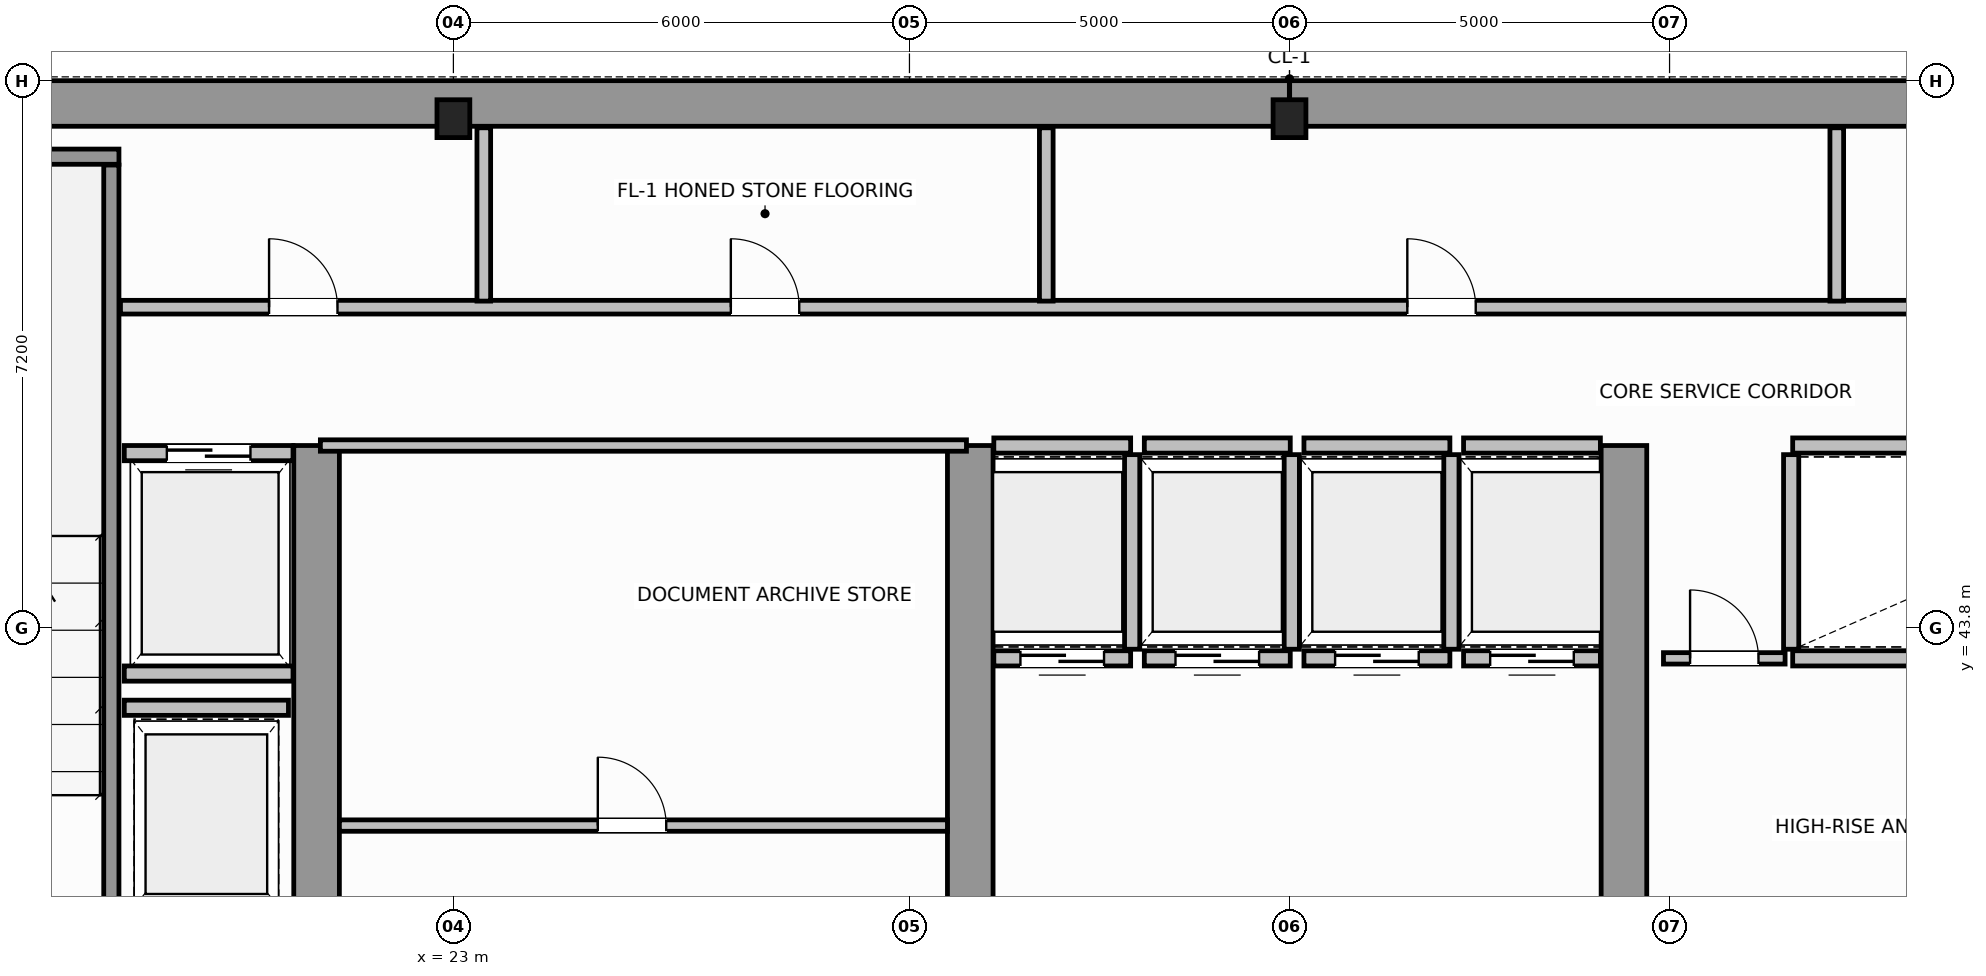
"""IFC4 building model, lengths in metres.
Left out: names, types, materials, properties, quantities, classifications, styles, units other than length and angle.
Written with IfcOpenShell. Run it as: python <this file> out.ifc"""

import sys

from ifc_helpers import new_model, si_unit, direction, frame, frame_2d, origin, origin_2d, place, context, subcontext, project, spatial, rectangle, i_section, extrude, source, transform, mapped, element, fill, save


model = new_model("IFC4")
c1 = context("Model", 3, precision=1e-05, world=origin(), true_north=direction((0.0, 1.0)))
c2 = subcontext(c1, "Body", "Model", "MODEL_VIEW")
j1 = project(units=[si_unit("LENGTHUNIT", "METRE"), si_unit("PLANEANGLEUNIT", "RADIAN")], contexts=[c1])
p1 = place(None, origin())
s1 = spatial("IfcSite", under=j1, at=p1, CompositionType="ELEMENT")
p2 = place(p1, origin())
s2 = spatial("IfcBuilding", under=s1, at=p2, CompositionType="ELEMENT")
p3 = place(p2, frame((0.0, 0.0, 191.8)))
s3 = spatial("IfcBuildingStorey", under=s2, at=p3, CompositionType="ELEMENT", Elevation=191.8)
m1 = source(origin(), c2, "Body", "SweptSolid", [
    extrude(i_section(OverallWidth=0.432, OverallDepth=0.498, WebThickness=0.055, FlangeThickness=0.068, FilletRadius=0.015, at=origin_2d()), origin(), (0.0, 0.0, 1.0), 3.8),
])
for number, where, z_axis, x_axis in (
    (1, (23.0, 50.5, 0.0), (0.0, 0.0, 1.0), (1.0, 0.0, 0.0)),
    (2, (34.0, 50.5, 0.0), (0.0, 0.0, 1.0), (1.0, 0.0, 0.0)),
):
    element("IfcColumn", number, at=place(p3, frame(where, z_axis=z_axis, x_axis=x_axis)), inside=s3, PredefinedType="COLUMN", context=c2, shape_type="MappedRepresentation", body=[
        mapped(m1, transform((0.0, 0.0, 0.0), scale=1.0)),
    ])
for number, where, z_axis, x_axis in (
    (3, (14.304, 50.7, 0.0), (0.0, 0.0, 1.0), (1.0, 0.0, 0.0)),
    (4, (34.002, 50.7, 0.0), (0.0, 0.0, 1.0), (1.0, 0.0, 0.0)),
):
    element("IfcWall", number, at=place(p3, frame(where, z_axis=z_axis, x_axis=x_axis)), inside=s3, PredefinedType="SHEAR", context=c2, shape_type="SweptSolid", body=[
        extrude(rectangle(XDim=19.694, YDim=0.6, at=frame_2d((9.847, 0.0))), origin(), (0.0, 0.0, 1.0), 3.8),
    ])
for number, where, z_axis, x_axis in (
    (5, (21.2, 36.82, 0.0), (0.0, 0.0, 1.0), (0.0, 1.0, 0.0)),
    (6, (29.8, 36.82, 0.0), (0.0, 0.0, 1.0), (0.0, 1.0, 0.0)),
    (7, (38.4, 36.82, 0.0), (0.0, 0.0, 1.0), (0.0, 1.0, 0.0)),
):
    element("IfcWall", number, at=place(p3, frame(where, z_axis=z_axis, x_axis=x_axis)), inside=s3, PredefinedType="SHEAR", context=c2, shape_type="SweptSolid", body=[
        extrude(rectangle(XDim=9.38, YDim=0.6, at=frame_2d((4.69, 0.0))), origin(), (0.0, 0.0, 1.0), 3.8),
    ])
p4 = place(p3, frame((14.3, 50.0, 0.0), z_axis=(0.0, 0.0, 1.0), x_axis=(1.0, 0.0, 0.0)))
e8 = element("IfcWall", 8, at=p4, inside=s3, PredefinedType="SOLIDWALL", context=c2, shape_type="SweptSolid", body=[
    extrude(rectangle(XDim=4.3, YDim=0.2, at=frame_2d((2.15, 0.0))), origin(), (0.0, 0.0, 1.0), 3.8),
])
p5 = place(p3, frame((18.5, 39.96, 0.0), z_axis=(0.0, 0.0, 1.0), x_axis=(0.0, 1.0, 0.0)))
e9 = element("IfcWall", 9, at=p5, inside=s3, PredefinedType="SOLIDWALL", context=c2, shape_type="SweptSolid", body=[
    extrude(rectangle(XDim=9.93, YDim=0.2, at=frame_2d((4.965, 0.0))), origin(), (0.0, 0.0, 1.0), 3.8),
])
p6 = place(p3, frame((30.11, 43.4, 0.0), z_axis=(0.0, 0.0, 1.0), x_axis=(1.0, 0.0, 0.0)))
e10 = element("IfcWall", 10, at=p6, inside=s3, PredefinedType="SOLIDWALL", context=c2, shape_type="SweptSolid", body=[
    extrude(rectangle(XDim=1.8, YDim=0.2, at=frame_2d((0.9, 0.0))), origin(), (0.0, 0.0, 1.0), 3.58),
])
p7 = place(p6, frame((0.35, 0.0, 0.0)))
e11 = element("IfcOpeningElement", 11, at=p7, cuts=e10, PredefinedType="OPENING", context=c2, shape_type="SweptSolid", body=[
    extrude(rectangle(XDim=1.1, YDim=2.15, at=frame_2d((0.55, 1.075))), frame((0.0, 0.11, 0.0), z_axis=(0.0, -1.0, 0.0), x_axis=(1.0, 0.0, 0.0)), (0.0, 0.0, 1.0), 0.22),
])
p8 = place(p3, frame((30.11, 46.2, 0.0), z_axis=(0.0, 0.0, 1.0), x_axis=(1.0, 0.0, 0.0)))
e12 = element("IfcWall", 12, at=p8, inside=s3, PredefinedType="SOLIDWALL", context=c2, shape_type="SweptSolid", body=[
    extrude(rectangle(XDim=1.8, YDim=0.2, at=frame_2d((0.9, 0.0))), origin(), (0.0, 0.0, 1.0), 3.58),
])
p9 = place(p3, frame((31.93, 43.52, 0.0), z_axis=(0.0, 0.0, 1.0), x_axis=(0.0, 1.0, 0.0)))
e13 = element("IfcWall", 13, at=p9, inside=s3, PredefinedType="SOLIDWALL", context=c2, shape_type="SweptSolid", body=[
    extrude(rectangle(XDim=2.56, YDim=0.2, at=frame_2d((1.28, 0.0))), origin(), (0.0, 0.0, 1.0), 3.58),
])
p10 = place(p3, frame((32.09, 43.4, 0.0), z_axis=(0.0, 0.0, 1.0), x_axis=(1.0, 0.0, 0.0)))
e14 = element("IfcWall", 14, at=p10, inside=s3, PredefinedType="SOLIDWALL", context=c2, shape_type="SweptSolid", body=[
    extrude(rectangle(XDim=1.92, YDim=0.2, at=frame_2d((0.96, 0.0))), origin(), (0.0, 0.0, 1.0), 3.58),
])
p11 = place(p10, frame((0.41, 0.0, 0.0)))
e15 = element("IfcOpeningElement", 15, at=p11, cuts=e14, PredefinedType="OPENING", context=c2, shape_type="SweptSolid", body=[
    extrude(rectangle(XDim=1.1, YDim=2.15, at=frame_2d((0.55, 1.075))), frame((0.0, 0.11, 0.0), z_axis=(0.0, -1.0, 0.0), x_axis=(1.0, 0.0, 0.0)), (0.0, 0.0, 1.0), 0.22),
])
p12 = place(p3, frame((32.09, 46.2, 0.0), z_axis=(0.0, 0.0, 1.0), x_axis=(1.0, 0.0, 0.0)))
e16 = element("IfcWall", 16, at=p12, inside=s3, PredefinedType="SOLIDWALL", context=c2, shape_type="SweptSolid", body=[
    extrude(rectangle(XDim=1.92, YDim=0.2, at=frame_2d((0.96, 0.0))), origin(), (0.0, 0.0, 1.0), 3.58),
])
p13 = place(p3, frame((34.03, 43.52, 0.0), z_axis=(0.0, 0.0, 1.0), x_axis=(0.0, 1.0, 0.0)))
e17 = element("IfcWall", 17, at=p13, inside=s3, PredefinedType="SOLIDWALL", context=c2, shape_type="SweptSolid", body=[
    extrude(rectangle(XDim=2.56, YDim=0.2, at=frame_2d((1.28, 0.0))), origin(), (0.0, 0.0, 1.0), 3.58),
])
p14 = place(p3, frame((34.19, 43.4, 0.0), z_axis=(0.0, 0.0, 1.0), x_axis=(1.0, 0.0, 0.0)))
e18 = element("IfcWall", 18, at=p14, inside=s3, PredefinedType="SOLIDWALL", context=c2, shape_type="SweptSolid", body=[
    extrude(rectangle(XDim=1.92, YDim=0.2, at=frame_2d((0.96, 0.0))), origin(), (0.0, 0.0, 1.0), 3.58),
])
p15 = place(p14, frame((0.41, 0.0, 0.0)))
e19 = element("IfcOpeningElement", 19, at=p15, cuts=e18, PredefinedType="OPENING", context=c2, shape_type="SweptSolid", body=[
    extrude(rectangle(XDim=1.1, YDim=2.15, at=frame_2d((0.55, 1.075))), frame((0.0, 0.11, 0.0), z_axis=(0.0, -1.0, 0.0), x_axis=(1.0, 0.0, 0.0)), (0.0, 0.0, 1.0), 0.22),
])
p16 = place(p3, frame((34.19, 46.2, 0.0), z_axis=(0.0, 0.0, 1.0), x_axis=(1.0, 0.0, 0.0)))
e20 = element("IfcWall", 20, at=p16, inside=s3, PredefinedType="SOLIDWALL", context=c2, shape_type="SweptSolid", body=[
    extrude(rectangle(XDim=1.92, YDim=0.2, at=frame_2d((0.96, 0.0))), origin(), (0.0, 0.0, 1.0), 3.58),
])
p17 = place(p3, frame((36.13, 43.52, 0.0), z_axis=(0.0, 0.0, 1.0), x_axis=(0.0, 1.0, 0.0)))
e21 = element("IfcWall", 21, at=p17, inside=s3, PredefinedType="SOLIDWALL", context=c2, shape_type="SweptSolid", body=[
    extrude(rectangle(XDim=2.56, YDim=0.2, at=frame_2d((1.28, 0.0))), origin(), (0.0, 0.0, 1.0), 3.58),
])
p18 = place(p3, frame((36.29, 43.4, 0.0), z_axis=(0.0, 0.0, 1.0), x_axis=(1.0, 0.0, 0.0)))
e22 = element("IfcWall", 22, at=p18, inside=s3, PredefinedType="SOLIDWALL", context=c2, shape_type="SweptSolid", body=[
    extrude(rectangle(XDim=1.8, YDim=0.2, at=frame_2d((0.9, 0.0))), origin(), (0.0, 0.0, 1.0), 3.58),
])
p19 = place(p18, frame((0.35, 0.0, 0.0)))
e23 = element("IfcOpeningElement", 23, at=p19, cuts=e22, PredefinedType="OPENING", context=c2, shape_type="SweptSolid", body=[
    extrude(rectangle(XDim=1.1, YDim=2.15, at=frame_2d((0.55, 1.075))), frame((0.0, 0.11, 0.0), z_axis=(0.0, -1.0, 0.0), x_axis=(1.0, 0.0, 0.0)), (0.0, 0.0, 1.0), 0.22),
])
p20 = place(p3, frame((36.29, 46.2, 0.0), z_axis=(0.0, 0.0, 1.0), x_axis=(1.0, 0.0, 0.0)))
e24 = element("IfcWall", 24, at=p20, inside=s3, PredefinedType="SOLIDWALL", context=c2, shape_type="SweptSolid", body=[
    extrude(rectangle(XDim=1.8, YDim=0.2, at=frame_2d((0.9, 0.0))), origin(), (0.0, 0.0, 1.0), 3.58),
])
for number, where, z_axis, x_axis in (
    (25, (40.62, 43.4, 0.0), (0.0, 0.0, 1.0), (1.0, 0.0, 0.0)),
    (26, (40.62, 46.2, 0.0), (0.0, 0.0, 1.0), (1.0, 0.0, 0.0)),
):
    element("IfcWall", number, at=place(p3, frame(where, z_axis=z_axis, x_axis=x_axis)), inside=s3, PredefinedType="SOLIDWALL", context=c2, shape_type="SweptSolid", body=[
        extrude(rectangle(XDim=1.86, YDim=0.2, at=frame_2d((0.93, 0.0))), origin(), (0.0, 0.0, 1.0), 3.58),
    ])
p21 = place(p3, frame((40.6, 43.52, 0.0), z_axis=(0.0, 0.0, 1.0), x_axis=(0.0, 1.0, 0.0)))
e27 = element("IfcWall", 27, at=p21, inside=s3, PredefinedType="SOLIDWALL", context=c2, shape_type="SweptSolid", body=[
    extrude(rectangle(XDim=2.56, YDim=0.2, at=frame_2d((1.28, 0.0))), origin(), (0.0, 0.0, 1.0), 3.58),
])
p22 = place(p3, frame((18.67, 46.1, 0.0), z_axis=(0.0, 0.0, 1.0), x_axis=(1.0, 0.0, 0.0)))
e28 = element("IfcWall", 28, at=p22, inside=s3, PredefinedType="SOLIDWALL", context=c2, shape_type="SweptSolid", body=[
    extrude(rectangle(XDim=2.22, YDim=0.2, at=frame_2d((1.11, 0.0))), origin(), (0.0, 0.0, 1.0), 3.58),
])
p23 = place(p22, frame((0.56, 0.0, 0.0)))
e29 = element("IfcOpeningElement", 29, at=p23, cuts=e28, PredefinedType="OPENING", context=c2, shape_type="SweptSolid", body=[
    extrude(rectangle(XDim=1.1, YDim=2.15, at=frame_2d((0.55, 1.075))), frame((0.0, 0.11, 0.0), z_axis=(0.0, -1.0, 0.0), x_axis=(1.0, 0.0, 0.0)), (0.0, 0.0, 1.0), 0.22),
])
p24 = place(p3, frame((18.67, 43.2, 0.0), z_axis=(0.0, 0.0, 1.0), x_axis=(1.0, 0.0, 0.0)))
e30 = element("IfcWall", 30, at=p24, inside=s3, PredefinedType="SOLIDWALL", context=c2, shape_type="SweptSolid", body=[
    extrude(rectangle(XDim=2.22, YDim=0.2, at=frame_2d((1.11, 0.0))), origin(), (0.0, 0.0, 1.0), 3.58),
])
p25 = place(p3, frame((18.67, 42.75, 0.0), z_axis=(0.0, 0.0, 1.0), x_axis=(1.0, 0.0, 0.0)))
e31 = element("IfcWall", 31, at=p25, inside=s3, PredefinedType="SOLIDWALL", context=c2, shape_type="SweptSolid", body=[
    extrude(rectangle(XDim=2.16, YDim=0.2, at=frame_2d((1.08, 0.0))), origin(), (0.0, 0.0, 1.0), 3.58),
])
p26 = place(p3, frame((21.25, 46.2, 0.0), z_axis=(0.0, 0.0, 1.0), x_axis=(1.0, 0.0, 0.0)))
e32 = element("IfcWall", 32, at=p26, inside=s3, PredefinedType="PARTITIONING", context=c2, shape_type="SweptSolid", body=[
    extrude(rectangle(XDim=8.5, YDim=0.15, at=frame_2d((4.25, 0.0))), origin(), (0.0, 0.0, 1.0), 3.58),
])
p27 = place(p3, frame((21.5, 41.2, 0.0), z_axis=(0.0, 0.0, 1.0), x_axis=(1.0, 0.0, 0.0)))
e33 = element("IfcWall", 33, at=p27, inside=s3, PredefinedType="PARTITIONING", context=c2, shape_type="SweptSolid", body=[
    extrude(rectangle(XDim=8.0, YDim=0.15, at=frame_2d((4.0, 0.0))), origin(), (0.0, 0.0, 1.0), 3.58),
])
p28 = place(p27, frame((3.4, 0.0, 0.0)))
e34 = element("IfcOpeningElement", 34, at=p28, cuts=e33, PredefinedType="OPENING", context=c2, shape_type="SweptSolid", body=[
    extrude(rectangle(XDim=0.9, YDim=2.1, at=frame_2d((0.45, 1.05))), frame((0.0, 0.085, 0.0), z_axis=(0.0, -1.0, 0.0), x_axis=(1.0, 0.0, 0.0)), (0.0, 0.0, 1.0), 0.17),
])
p29 = place(p3, frame((38.92, 43.4, 0.0), z_axis=(0.0, 0.0, 1.0), x_axis=(1.0, 0.0, 0.0)))
e35 = element("IfcWall", 35, at=p29, inside=s3, PredefinedType="PARTITIONING", context=c2, shape_type="SweptSolid", body=[
    extrude(rectangle(XDim=1.6, YDim=0.15, at=frame_2d((0.8, 0.0))), origin(), (0.0, 0.0, 1.0), 3.58),
])
p30 = place(p29, frame((0.35, 0.0, 0.0)))
e36 = element("IfcOpeningElement", 36, at=p30, cuts=e35, PredefinedType="OPENING", context=c2, shape_type="SweptSolid", body=[
    extrude(rectangle(XDim=0.9, YDim=2.1, at=frame_2d((0.45, 1.05))), frame((0.0, 0.085, 0.0), z_axis=(0.0, -1.0, 0.0), x_axis=(1.0, 0.0, 0.0)), (0.0, 0.0, 1.0), 0.17),
])
p31 = place(p3, frame((18.62, 48.02, 0.0), z_axis=(0.0, 0.0, 1.0), x_axis=(1.0, 0.0, 0.0)))
e37 = element("IfcWall", 37, at=p31, inside=s3, PredefinedType="PLUMBINGWALL", context=c2, shape_type="SweptSolid", body=[
    extrude(rectangle(XDim=30.76, YDim=0.18, at=frame_2d((15.38, 0.0))), origin(), (0.0, 0.0, 1.0), 3.58),
])
p32 = place(p31, frame((1.955, 0.0, 0.0)))
e38 = element("IfcOpeningElement", 38, at=p32, cuts=e37, PredefinedType="OPENING", context=c2, shape_type="SweptSolid", body=[
    extrude(rectangle(XDim=0.9, YDim=2.15, at=frame_2d((0.45, 1.075))), frame((0.0, 0.1, 0.0), z_axis=(0.0, -1.0, 0.0), x_axis=(1.0, 0.0, 0.0)), (0.0, 0.0, 1.0), 0.2),
])
p33 = place(p31, frame((8.03, 0.0, 0.0)))
e39 = element("IfcOpeningElement", 39, at=p33, cuts=e37, PredefinedType="OPENING", context=c2, shape_type="SweptSolid", body=[
    extrude(rectangle(XDim=0.9, YDim=2.15, at=frame_2d((0.45, 1.075))), frame((0.0, 0.1, 0.0), z_axis=(0.0, -1.0, 0.0), x_axis=(1.0, 0.0, 0.0)), (0.0, 0.0, 1.0), 0.2),
])
p34 = place(p31, frame((16.93, 0.0, 0.0)))
e40 = element("IfcOpeningElement", 40, at=p34, cuts=e37, PredefinedType="OPENING", context=c2, shape_type="SweptSolid", body=[
    extrude(rectangle(XDim=0.9, YDim=2.15, at=frame_2d((0.45, 1.075))), frame((0.0, 0.1, 0.0), z_axis=(0.0, -1.0, 0.0), x_axis=(1.0, 0.0, 0.0)), (0.0, 0.0, 1.0), 0.2),
])
p35 = place(p31, frame((26.205, 0.0, 0.0)))
e41 = element("IfcOpeningElement", 41, at=p35, cuts=e37, PredefinedType="OPENING", context=c2, shape_type="SweptSolid", body=[
    extrude(rectangle(XDim=0.9, YDim=2.15, at=frame_2d((0.45, 1.075))), frame((0.0, 0.1, 0.0), z_axis=(0.0, -1.0, 0.0), x_axis=(1.0, 0.0, 0.0)), (0.0, 0.0, 1.0), 0.2),
])
for number, where, z_axis, x_axis in (
    (42, (23.4, 48.1, 0.0), (0.0, 0.0, 1.0), (0.0, 1.0, 0.0)),
    (43, (30.8, 48.1, 0.0), (0.0, 0.0, 1.0), (0.0, 1.0, 0.0)),
    (44, (41.2, 48.1, 0.0), (0.0, 0.0, 1.0), (0.0, 1.0, 0.0)),
):
    element("IfcWall", number, at=place(p3, frame(where, z_axis=z_axis, x_axis=x_axis)), inside=s3, PredefinedType="PLUMBINGWALL", context=c2, shape_type="SweptSolid", body=[
        extrude(rectangle(XDim=2.28, YDim=0.18, at=frame_2d((1.14, 0.0))), origin(), (0.0, 0.0, 1.0), 3.58),
    ])
m2 = source(origin(), c2, "Body", "SweptSolid", [
    extrude(rectangle(XDim=1.1, YDim=2.15, at=frame_2d((0.55, 1.075))), frame((0.0, 0.025, 0.0), z_axis=(0.0, -1.0, 0.0), x_axis=(1.0, 0.0, 0.0)), (0.0, 0.0, 1.0), 0.05),
])
p36 = place(p7, origin())
e45 = element("IfcDoor", 45, at=p36, inside=s3, OperationType="DOUBLE_DOOR_SLIDING", PredefinedType="DOOR", context=c2, shape_type="MappedRepresentation", body=[
    mapped(m2, transform((0.0, 0.0, 0.0), scale=1.0)),
])
fill(e11, e45)
p37 = place(p11, origin())
e46 = element("IfcDoor", 46, at=p37, inside=s3, OperationType="DOUBLE_DOOR_SLIDING", PredefinedType="DOOR", context=c2, shape_type="MappedRepresentation", body=[
    mapped(m2, transform((0.0, 0.0, 0.0), scale=1.0)),
])
fill(e15, e46)
p38 = place(p15, origin())
e47 = element("IfcDoor", 47, at=p38, inside=s3, OperationType="DOUBLE_DOOR_SLIDING", PredefinedType="DOOR", context=c2, shape_type="MappedRepresentation", body=[
    mapped(m2, transform((0.0, 0.0, 0.0), scale=1.0)),
])
fill(e19, e47)
p39 = place(p19, origin())
e48 = element("IfcDoor", 48, at=p39, inside=s3, OperationType="DOUBLE_DOOR_SLIDING", PredefinedType="DOOR", context=c2, shape_type="MappedRepresentation", body=[
    mapped(m2, transform((0.0, 0.0, 0.0), scale=1.0)),
])
fill(e23, e48)
p40 = place(p23, origin())
e49 = element("IfcDoor", 49, at=p40, inside=s3, OperationType="DOUBLE_DOOR_SLIDING", PredefinedType="DOOR", context=c2, shape_type="MappedRepresentation", body=[
    mapped(m2, transform((0.0, 0.0, 0.0), scale=1.0)),
])
fill(e29, e49)
m3 = source(origin(), c2, "Body", "SweptSolid", [
    extrude(rectangle(XDim=0.9, YDim=2.1, at=frame_2d((0.45, 1.05))), frame((0.0, 0.025, 0.0), z_axis=(0.0, -1.0, 0.0), x_axis=(1.0, 0.0, 0.0)), (0.0, 0.0, 1.0), 0.05),
])
p41 = place(p28, origin())
e50 = element("IfcDoor", 50, at=p41, inside=s3, OperationType="SINGLE_SWING_RIGHT", PredefinedType="DOOR", context=c2, shape_type="MappedRepresentation", body=[
    mapped(m3, transform((0.0, 0.0, 0.0), scale=1.0)),
])
fill(e34, e50)
p42 = place(p30, origin())
e51 = element("IfcDoor", 51, at=p42, inside=s3, OperationType="SINGLE_SWING_LEFT", PredefinedType="DOOR", context=c2, shape_type="MappedRepresentation", body=[
    mapped(m3, transform((0.0, 0.0, 0.0), scale=1.0)),
])
fill(e36, e51)
m4 = source(origin(), c2, "Body", "SweptSolid", [
    extrude(rectangle(XDim=0.9, YDim=2.15, at=frame_2d((0.45, 1.075))), frame((0.0, 0.025, 0.0), z_axis=(0.0, -1.0, 0.0), x_axis=(1.0, 0.0, 0.0)), (0.0, 0.0, 1.0), 0.05),
])
p43 = place(p32, origin())
e52 = element("IfcDoor", 52, at=p43, inside=s3, OperationType="SINGLE_SWING_LEFT", PredefinedType="DOOR", context=c2, shape_type="MappedRepresentation", body=[
    mapped(m4, transform((0.0, 0.0, 0.0), scale=1.0)),
])
fill(e38, e52)
p44 = place(p33, origin())
e53 = element("IfcDoor", 53, at=p44, inside=s3, OperationType="SINGLE_SWING_RIGHT", PredefinedType="DOOR", context=c2, shape_type="MappedRepresentation", body=[
    mapped(m4, transform((0.0, 0.0, 0.0), scale=1.0)),
])
fill(e39, e53)
p45 = place(p34, origin())
e54 = element("IfcDoor", 54, at=p45, inside=s3, OperationType="SINGLE_SWING_LEFT", PredefinedType="DOOR", context=c2, shape_type="MappedRepresentation", body=[
    mapped(m4, transform((0.0, 0.0, 0.0), scale=1.0)),
])
fill(e40, e54)
save(model, sys.argv[1])
